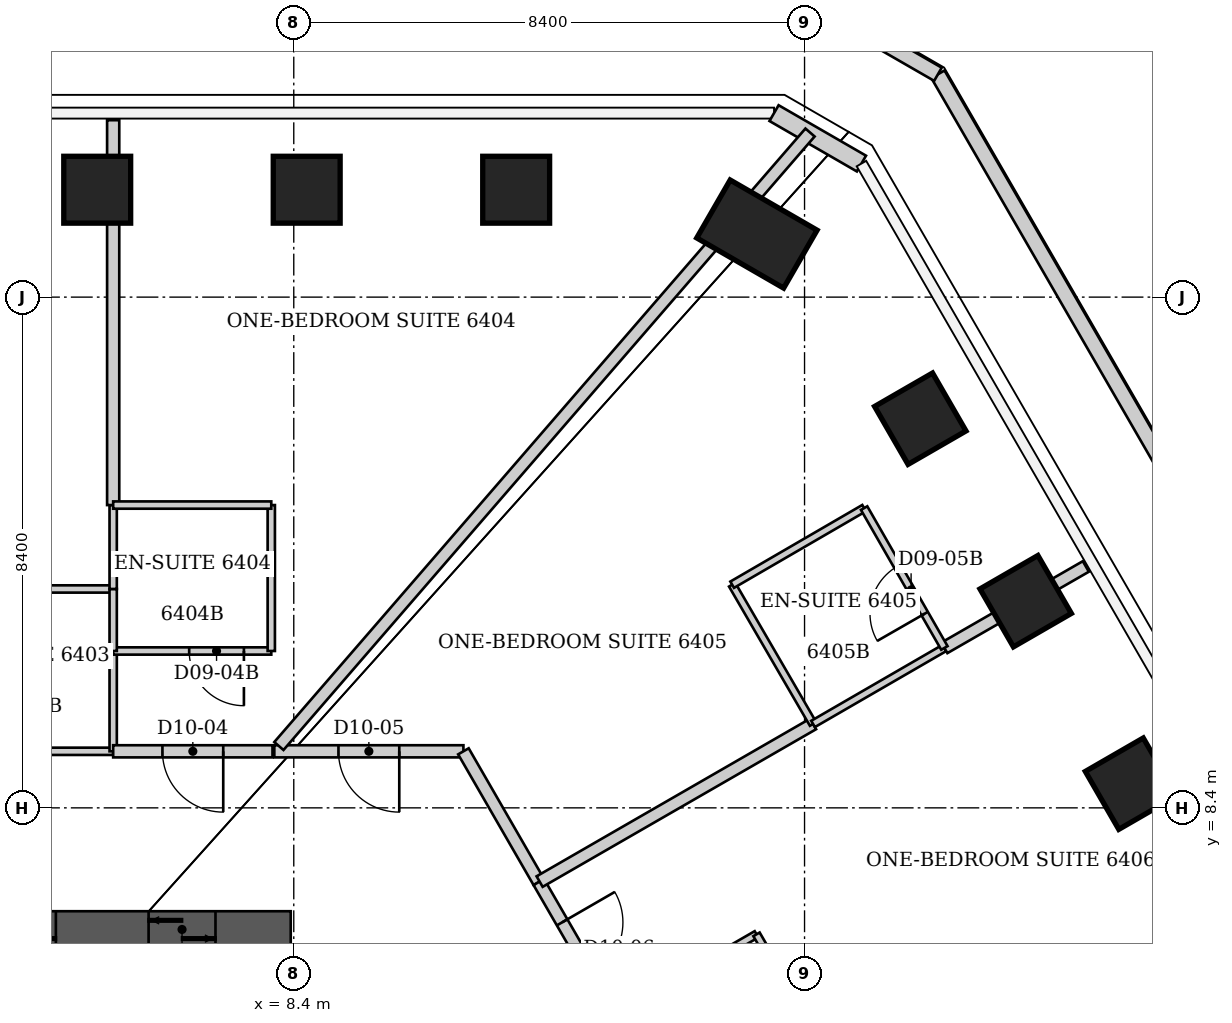
"""IFC4 building model, lengths in metres.
Left out: names, types, materials, properties, quantities, classifications, styles, units other than length and angle.
Written with IfcOpenShell. Run it as: python <this file> out.ifc"""

import sys

from ifc_helpers import new_model, si_unit, direction, frame, frame_2d, origin, origin_2d, place, context, subcontext, project, spatial, rectangle, extrude, clip, halfspace, element, fill, save


model = new_model("IFC4")
c1 = context("Model", 3, precision=1e-05, world=origin(), true_north=direction((0.0, 1.0)))
c2 = subcontext(c1, "Body", "Model", "MODEL_VIEW")
j1 = project(units=[si_unit("LENGTHUNIT", "METRE"), si_unit("PLANEANGLEUNIT", "RADIAN")], contexts=[c1])
p1 = place(None, origin())
s1 = spatial("IfcSite", under=j1, at=p1, CompositionType="ELEMENT")
p2 = place(p1, origin())
s2 = spatial("IfcBuilding", under=s1, at=p2, CompositionType="ELEMENT")
p3 = place(p2, frame((0.0, 0.0, 257.0)))
s3 = spatial("IfcBuildingStorey", under=s2, at=p3, CompositionType="ELEMENT", Elevation=257.0)
p4 = place(p3, frame((5.167, 18.566, -0.052), z_axis=(0.0, 0.0, 1.0), x_axis=(0.0, 1.0, 0.0)))
e1 = element("IfcColumn", 1, at=p4, inside=s3, PredefinedType="COLUMN", context=c2, shape_type="SweptSolid", body=[
    clip(extrude(rectangle(XDim=1.1, YDim=1.1, at=origin_2d()), origin(), (0.0, 0.0, 1.0), 3.852), halfspace(frame((0.0, 0.0, 0.052)), True)),
])
p5 = place(p3, frame((8.613, 18.566, -0.06), z_axis=(0.0, 0.0, 1.0), x_axis=(0.0, 1.0, 0.0)))
e2 = element("IfcColumn", 2, at=p5, inside=s3, PredefinedType="COLUMN", context=c2, shape_type="SweptSolid", body=[
    clip(extrude(rectangle(XDim=1.1, YDim=1.1, at=origin_2d()), origin(), (0.0, 0.0, 1.0), 3.86), halfspace(frame((0.0, 0.0, 0.06)), True)),
])
p6 = place(p3, frame((12.058, 18.566, -0.067), z_axis=(0.0, 0.0, 1.0), x_axis=(0.0, 1.0, 0.0)))
e3 = element("IfcColumn", 3, at=p6, inside=s3, PredefinedType="COLUMN", context=c2, shape_type="SweptSolid", body=[
    clip(extrude(rectangle(XDim=1.1, YDim=1.1, at=origin_2d()), origin(), (0.0, 0.0, 1.0), 3.867), halfspace(frame((0.0, 0.0, 0.067)), True)),
])
p7 = place(p3, frame((16.017, 17.837, -0.069), z_axis=(0.0, 0.0, 1.0), x_axis=(0.5, 0.866025403784, 0.0)))
e4 = element("IfcColumn", 4, at=p7, inside=s3, PredefinedType="COLUMN", context=c2, shape_type="SweptSolid", body=[
    clip(extrude(rectangle(XDim=1.1, YDim=1.65, at=origin_2d()), origin(), (0.0, 0.0, 1.0), 3.869), halfspace(frame((0.0, 0.0, 0.069)), True)),
])
p8 = place(p3, frame((18.704, 14.8, -0.059), z_axis=(0.0, 0.0, 1.0), x_axis=(0.866025403784, 0.5, 0.0)))
e5 = element("IfcColumn", 5, at=p8, inside=s3, PredefinedType="COLUMN", context=c2, shape_type="SweptSolid", body=[
    clip(extrude(rectangle(XDim=1.1, YDim=1.1, at=origin_2d()), origin(), (0.0, 0.0, 1.0), 3.859), halfspace(frame((0.0, 0.0, 0.059)), True)),
])
p9 = place(p3, frame((20.437, 11.799, -0.051), z_axis=(0.0, 0.0, 1.0), x_axis=(0.866025403784, 0.5, 0.0)))
e6 = element("IfcColumn", 6, at=p9, inside=s3, PredefinedType="COLUMN", context=c2, shape_type="SweptSolid", body=[
    clip(extrude(rectangle(XDim=1.1, YDim=1.1, at=origin_2d()), origin(), (0.0, 0.0, 1.0), 3.851), halfspace(frame((0.0, 0.0, 0.051)), True)),
])
p10 = place(p3, frame((22.169, 8.798, -0.059), z_axis=(0.0, 0.0, 1.0), x_axis=(0.866025403784, 0.5, 0.0)))
e7 = element("IfcColumn", 7, at=p10, inside=s3, PredefinedType="COLUMN", context=c2, shape_type="SweptSolid", body=[
    clip(extrude(rectangle(XDim=1.1, YDim=1.1, at=origin_2d()), origin(), (0.0, 0.0, 1.0), 3.859), halfspace(frame((0.0, 0.0, 0.059)), True)),
])
p11 = place(p3, frame((-8.35, 6.4, 0.0), z_axis=(0.0, 0.0, 1.0), x_axis=(1.0, 0.0, 0.0)))
e8 = element("IfcWall", 8, at=p11, inside=s3, PredefinedType="SHEAR", context=c2, shape_type="SweptSolid", body=[
    extrude(rectangle(XDim=16.7, YDim=0.6, at=frame_2d((8.35, 0.0))), origin(), (0.0, 0.0, 1.0), 3.8),
])
p12 = place(p11, frame((6.488, 0.0, 0.0)))
e9 = element("IfcOpeningElement", 9, at=p12, cuts=e8, PredefinedType="OPENING", context=c2, shape_type="SweptSolid", body=[
    extrude(rectangle(XDim=1.1, YDim=2.1, at=frame_2d((0.55, 1.05))), frame((0.0, 0.3, 0.0), z_axis=(0.0, -1.0, 0.0), x_axis=(1.0, 0.0, 0.0)), (0.0, 0.0, 1.0), 0.6),
])
p13 = place(p11, frame((9.113, 0.0, 0.0)))
e10 = element("IfcOpeningElement", 10, at=p13, cuts=e8, PredefinedType="OPENING", context=c2, shape_type="SweptSolid", body=[
    extrude(rectangle(XDim=1.1, YDim=2.1, at=frame_2d((0.55, 1.05))), frame((0.0, 0.3, 0.0), z_axis=(0.0, -1.0, 0.0), x_axis=(1.0, 0.0, 0.0)), (0.0, 0.0, 1.0), 0.6),
])
p14 = place(p11, frame((11.738, 0.0, 0.0)))
e11 = element("IfcOpeningElement", 11, at=p14, cuts=e8, PredefinedType="OPENING", context=c2, shape_type="SweptSolid", body=[
    extrude(rectangle(XDim=1.1, YDim=2.1, at=frame_2d((0.55, 1.05))), frame((0.0, 0.3, 0.0), z_axis=(0.0, -1.0, 0.0), x_axis=(1.0, 0.0, 0.0)), (0.0, 0.0, 1.0), 0.6),
])
p15 = place(p11, frame((14.363, 0.0, 0.0)))
e12 = element("IfcOpeningElement", 12, at=p15, cuts=e8, PredefinedType="OPENING", context=c2, shape_type="SweptSolid", body=[
    extrude(rectangle(XDim=1.1, YDim=2.1, at=frame_2d((0.55, 1.05))), frame((0.0, 0.3, 0.0), z_axis=(0.0, -1.0, 0.0), x_axis=(1.0, 0.0, 0.0)), (0.0, 0.0, 1.0), 0.6),
])
p16 = place(p3, frame((16.298, 19.826, 0.0), z_axis=(0.0, 0.0, 1.0), x_axis=(0.866026405774, -0.499998264499, 0.0)))
e13 = element("IfcWall", 13, at=p16, inside=s3, PredefinedType="SOLIDWALL", context=c2, shape_type="SweptSolid", body=[
    extrude(rectangle(XDim=1.66, YDim=0.3, at=frame_2d((0.83, 0.0))), origin(), (0.0, 0.0, 1.0), 3.64),
])
p17 = place(p3, frame((27.22, 6.217, 0.0), z_axis=(0.0, 0.0, 1.0), x_axis=(-0.49999647861, 0.86602743685, 0.0)))
e14 = element("IfcWall", 14, at=p17, inside=s3, PredefinedType="PARAPET", context=c2, shape_type="SweptSolid", body=[
    extrude(rectangle(XDim=16.453, YDim=0.25, at=frame_2d((8.226, 0.0))), origin(), (0.0, 0.0, 1.0), 1.1),
])
p18 = place(p3, frame((18.994, 20.465, 0.0), z_axis=(0.0, 0.0, 1.0), x_axis=(-0.866531606097, 0.499122205112, 0.0)))
e15 = element("IfcWall", 15, at=p18, inside=s3, PredefinedType="PARAPET", context=c2, shape_type="SweptSolid", body=[
    extrude(rectangle(XDim=1.761, YDim=0.25, at=frame_2d((0.88, 0.0))), origin(), (0.0, 0.0, 1.0), 1.1),
])
p19 = place(p3, frame((5.43, 9.33, 0.0), z_axis=(0.0, 0.0, 1.0), x_axis=(-1.0, 0.0, 0.0)))
e16 = element("IfcWall", 16, at=p19, inside=s3, PredefinedType="PARTITIONING", context=c2, shape_type="SweptSolid", body=[
    extrude(rectangle(XDim=2.45, YDim=0.12, at=frame_2d((1.225, 0.0))), origin(), (0.0, 0.0, 1.0), 3.64),
])
p20 = place(p3, frame((5.43, 10.98, 0.0), z_axis=(0.0, 0.0, 1.0), x_axis=(0.0, -1.0, 0.0)))
e17 = element("IfcWall", 17, at=p20, inside=s3, PredefinedType="PARTITIONING", context=c2, shape_type="SweptSolid", body=[
    extrude(rectangle(XDim=1.65, YDim=0.12, at=frame_2d((0.825, 0.0))), origin(), (0.0, 0.0, 1.0), 3.64),
])
p21 = place(p3, frame((5.43, 10.98, 0.0), z_axis=(0.0, 0.0, 1.0), x_axis=(1.0, 0.0, 0.0)))
e18 = element("IfcWall", 18, at=p21, inside=s3, PredefinedType="PARTITIONING", context=c2, shape_type="SweptSolid", body=[
    extrude(rectangle(XDim=2.6, YDim=0.12, at=frame_2d((1.3, 0.0))), origin(), (0.0, 0.0, 1.0), 3.64),
])
p22 = place(p21, frame((1.25, 0.0, 0.0)))
e19 = element("IfcOpeningElement", 19, at=p22, cuts=e18, PredefinedType="OPENING", context=c2, shape_type="SweptSolid", body=[
    extrude(rectangle(XDim=0.9, YDim=2.03, at=frame_2d((0.45, 1.015))), frame((0.0, 0.06, 0.0), z_axis=(0.0, -1.0, 0.0), x_axis=(1.0, 0.0, 0.0)), (0.0, 0.0, 1.0), 0.12),
])
p23 = place(p3, frame((5.43, 12.0, 0.0), z_axis=(0.0, 0.0, 1.0), x_axis=(-1.0, 0.0, 0.0)))
e20 = element("IfcWall", 20, at=p23, inside=s3, PredefinedType="PARTITIONING", context=c2, shape_type="SweptSolid", body=[
    extrude(rectangle(XDim=2.45, YDim=0.12, at=frame_2d((1.225, 0.0))), origin(), (0.0, 0.0, 1.0), 3.64),
])
p24 = place(p3, frame((5.43, 12.0, 0.0), z_axis=(0.0, 0.0, 1.0), x_axis=(0.0, -1.0, 0.0)))
e21 = element("IfcWall", 21, at=p24, inside=s3, PredefinedType="PARTITIONING", context=c2, shape_type="SweptSolid", body=[
    extrude(rectangle(XDim=1.02, YDim=0.12, at=frame_2d((0.51, 0.0))), origin(), (0.0, 0.0, 1.0), 3.64),
])
p25 = place(p3, frame((5.43, 13.38, 0.0), z_axis=(0.0, 0.0, 1.0), x_axis=(0.0, -1.0, 0.0)))
e22 = element("IfcWall", 22, at=p25, inside=s3, PredefinedType="PARTITIONING", context=c2, shape_type="SweptSolid", body=[
    extrude(rectangle(XDim=1.38, YDim=0.12, at=frame_2d((0.69, 0.0))), origin(), (0.0, 0.0, 1.0), 3.64),
])
p26 = place(p3, frame((5.43, 19.71, 0.0), z_axis=(0.0, 0.0, 1.0), x_axis=(0.0, -1.0, 0.0)))
e23 = element("IfcWall", 23, at=p26, inside=s3, PredefinedType="PARTITIONING", context=c2, shape_type="SweptSolid", body=[
    extrude(rectangle(XDim=6.33, YDim=0.2, at=frame_2d((3.165, 0.0))), origin(), (0.0, 0.0, 1.0), 3.64),
])
p27 = place(p3, frame((8.03, 10.98, 0.0), z_axis=(0.0, 0.0, 1.0), x_axis=(0.0, 1.0, 0.0)))
e24 = element("IfcWall", 24, at=p27, inside=s3, PredefinedType="PARTITIONING", context=c2, shape_type="SweptSolid", body=[
    extrude(rectangle(XDim=2.4, YDim=0.12, at=frame_2d((1.2, 0.0))), origin(), (0.0, 0.0, 1.0), 3.64),
])
p28 = place(p3, frame((8.03, 13.38, 0.0), z_axis=(0.0, 0.0, 1.0), x_axis=(-1.0, 0.0, 0.0)))
e25 = element("IfcWall", 25, at=p28, inside=s3, PredefinedType="PARTITIONING", context=c2, shape_type="SweptSolid", body=[
    extrude(rectangle(XDim=2.6, YDim=0.12, at=frame_2d((1.3, 0.0))), origin(), (0.0, 0.0, 1.0), 3.64),
])
p29 = place(p3, frame((8.05, 9.33, 0.0), z_axis=(0.0, 0.0, 1.0), x_axis=(-1.0, 0.0, 0.0)))
e26 = element("IfcWall", 26, at=p29, inside=s3, PredefinedType="PARTITIONING", context=c2, shape_type="SweptSolid", body=[
    extrude(rectangle(XDim=2.62, YDim=0.2, at=frame_2d((1.31, 0.0))), origin(), (0.0, 0.0, 1.0), 3.64),
])
p30 = place(p29, frame((0.81, 0.0, 0.0)))
e27 = element("IfcOpeningElement", 27, at=p30, cuts=e26, PredefinedType="OPENING", context=c2, shape_type="SweptSolid", body=[
    extrude(rectangle(XDim=1.0, YDim=2.13, at=frame_2d((0.5, 1.065))), frame((0.0, 0.1, 0.0), z_axis=(0.0, -1.0, 0.0), x_axis=(1.0, 0.0, 0.0)), (0.0, 0.0, 1.0), 0.2),
])
p31 = place(p3, frame((11.19, 9.33, 0.0), z_axis=(0.0, 0.0, 1.0), x_axis=(-1.0, 0.0, 0.0)))
e28 = element("IfcWall", 28, at=p31, inside=s3, PredefinedType="PARTITIONING", context=c2, shape_type="SweptSolid", body=[
    extrude(rectangle(XDim=3.11, YDim=0.2, at=frame_2d((1.555, 0.0))), origin(), (0.0, 0.0, 1.0), 3.64),
])
p32 = place(p31, frame((1.055, 0.0, 0.0)))
e29 = element("IfcOpeningElement", 29, at=p32, cuts=e28, PredefinedType="OPENING", context=c2, shape_type="SweptSolid", body=[
    extrude(rectangle(XDim=1.0, YDim=2.13, at=frame_2d((0.5, 1.065))), frame((0.0, 0.1, 0.0), z_axis=(0.0, -1.0, 0.0), x_axis=(1.0, 0.0, 0.0)), (0.0, 0.0, 1.0), 0.2),
])
p33 = place(p3, frame((11.19, 9.33, 0.0), z_axis=(0.0, 0.0, 1.0), x_axis=(0.499577688184, -0.866269088372, 0.0)))
e30 = element("IfcWall", 30, at=p33, inside=s3, PredefinedType="PARTITIONING", context=c2, shape_type="SweptSolid", body=[
    extrude(rectangle(XDim=2.482, YDim=0.2, at=frame_2d((1.241, 0.0))), origin(), (0.0, 0.0, 1.0), 3.64),
])
p34 = place(p3, frame((12.43, 7.18, 0.0), z_axis=(0.0, 0.0, 1.0), x_axis=(0.500329012441, -0.865835365015, 0.0)))
e31 = element("IfcWall", 31, at=p34, inside=s3, PredefinedType="PARTITIONING", context=c2, shape_type="SweptSolid", body=[
    extrude(rectangle(XDim=2.531, YDim=0.2, at=frame_2d((1.266, 0.0))), origin(), (0.0, 0.0, 1.0), 3.64),
])
p35 = place(p34, frame((0.766, 0.0, 0.0)))
e32 = element("IfcOpeningElement", 32, at=p35, cuts=e31, PredefinedType="OPENING", context=c2, shape_type="SweptSolid", body=[
    extrude(rectangle(XDim=1.0, YDim=2.13, at=frame_2d((0.5, 1.065))), frame((0.0, 0.1, 0.0), z_axis=(0.0, -1.0, 0.0), x_axis=(1.0, 0.0, 0.0)), (0.0, 0.0, 1.0), 0.2),
])
p36 = place(p3, frame((12.443, 7.188, 0.0), z_axis=(0.0, 0.0, 1.0), x_axis=(0.866335108717, 0.499463191241, 0.0)))
e33 = element("IfcWall", 33, at=p36, inside=s3, PredefinedType="PARTITIONING", context=c2, shape_type="SweptSolid", body=[
    extrude(rectangle(XDim=5.191, YDim=0.2, at=frame_2d((2.595, 0.0))), origin(), (0.0, 0.0, 1.0), 2.878),
])
p37 = place(p3, frame((15.61, 12.07, 0.0), z_axis=(0.0, 0.0, 1.0), x_axis=(0.502173326652, -0.864766991738, 0.0)))
e34 = element("IfcWall", 34, at=p37, inside=s3, PredefinedType="PARTITIONING", context=c2, shape_type="SweptSolid", body=[
    extrude(rectangle(XDim=2.648, YDim=0.12, at=frame_2d((1.324, 0.0))), origin(), (0.0, 0.0, 1.0), 3.64),
])
p38 = place(p3, frame((16.01, 6.32, 0.0), z_axis=(0.0, 0.0, 1.0), x_axis=(-0.866615255992, -0.498976951453, 0.0)))
e35 = element("IfcWall", 35, at=p38, inside=s3, PredefinedType="PARTITIONING", context=c2, shape_type="SweptSolid", body=[
    extrude(rectangle(XDim=2.666, YDim=0.12, at=frame_2d((1.333, 0.0))), origin(), (0.0, 0.0, 1.0), 3.64),
])
p39 = place(p38, frame((1.466, 0.0, 0.0)))
e36 = element("IfcOpeningElement", 36, at=p39, cuts=e35, PredefinedType="OPENING", context=c2, shape_type="SweptSolid", body=[
    extrude(rectangle(XDim=0.9, YDim=2.03, at=frame_2d((0.45, 1.015))), frame((0.0, 0.06, 0.0), z_axis=(0.0, -1.0, 0.0), x_axis=(1.0, 0.0, 0.0)), (0.0, 0.0, 1.0), 0.12),
])
p40 = place(p3, frame((16.89, 19.507, 0.0), z_axis=(0.0, 0.0, 1.0), x_axis=(-0.654509091565, -0.756054131037, 0.0)))
e37 = element("IfcWall", 37, at=p40, inside=s3, PredefinedType="PARTITIONING", context=c2, shape_type="SweptSolid", body=[
    extrude(rectangle(XDim=13.346, YDim=0.2, at=frame_2d((6.673, 0.0))), origin(), (0.0, 0.0, 1.0), 3.64),
])
p41 = place(p3, frame((16.94, 9.78, 0.0), z_axis=(0.0, 0.0, 1.0), x_axis=(0.865533423938, 0.500851167559, 0.0)))
e38 = element("IfcWall", 38, at=p41, inside=s3, PredefinedType="PARTITIONING", context=c2, shape_type="SweptSolid", body=[
    extrude(rectangle(XDim=2.496, YDim=0.12, at=frame_2d((1.248, 0.0))), origin(), (0.0, 0.0, 1.0), 2.878),
])
p42 = place(p3, frame((17.26, 4.16, 0.0), z_axis=(0.0, 0.0, 1.0), x_axis=(-0.500851167559, 0.865533423938, 0.0)))
e39 = element("IfcWall", 39, at=p42, inside=s3, PredefinedType="PARTITIONING", context=c2, shape_type="SweptSolid", body=[
    extrude(rectangle(XDim=2.496, YDim=0.12, at=frame_2d((1.248, 0.0))), origin(), (0.0, 0.0, 1.0), 3.64),
])
p43 = place(p3, frame((17.78, 13.33, 0.0), z_axis=(0.0, 0.0, 1.0), x_axis=(-0.864803937094, -0.502109699555, 0.0)))
e40 = element("IfcWall", 40, at=p43, inside=s3, PredefinedType="PARTITIONING", context=c2, shape_type="SweptSolid", body=[
    extrude(rectangle(XDim=2.51, YDim=0.12, at=frame_2d((1.255, 0.0))), origin(), (0.0, 0.0, 1.0), 3.64),
])
p44 = place(p3, frame((19.099, 11.031, 0.0), z_axis=(0.0, 0.0, 1.0), x_axis=(0.866739223556, 0.498761584678, 0.0)))
e41 = element("IfcWall", 41, at=p44, inside=s3, PredefinedType="PARTITIONING", context=c2, shape_type="SweptSolid", body=[
    extrude(rectangle(XDim=2.684, YDim=0.2, at=frame_2d((1.342, 0.0))), origin(), (0.0, 0.0, 1.0), 2.878),
])
p45 = place(p3, frame((19.1, 11.03, 0.0), z_axis=(0.0, 0.0, 1.0), x_axis=(-0.497773911185, 0.867306827682, 0.0)))
e42 = element("IfcWall", 42, at=p45, inside=s3, PredefinedType="PARTITIONING", context=c2, shape_type="SweptSolid", body=[
    extrude(rectangle(XDim=2.652, YDim=0.12, at=frame_2d((1.326, 0.0))), origin(), (0.0, 0.0, 1.0), 3.64),
])
p46 = place(p45, frame((0.65, 0.0, 0.0)))
e43 = element("IfcOpeningElement", 43, at=p46, cuts=e42, PredefinedType="OPENING", context=c2, shape_type="SweptSolid", body=[
    extrude(rectangle(XDim=0.9, YDim=2.03, at=frame_2d((0.45, 1.015))), frame((0.0, 0.06, 0.0), z_axis=(0.0, -1.0, 0.0), x_axis=(1.0, 0.0, 0.0)), (0.0, 0.0, 1.0), 0.12),
])
p47 = place(p30, origin())
e44 = element("IfcDoor", 44, at=p47, inside=s3, OperationType="SINGLE_SWING_LEFT", PredefinedType="DOOR", context=c2, shape_type="SweptSolid", body=[
    extrude(rectangle(XDim=1.0, YDim=2.13, at=frame_2d((0.5, 1.065))), frame((0.0, 0.025, 0.0), z_axis=(0.0, -1.0, 0.0), x_axis=(1.0, 0.0, 0.0)), (0.0, 0.0, 1.0), 0.05),
])
fill(e27, e44)
p48 = place(p22, origin())
e45 = element("IfcDoor", 45, at=p48, inside=s3, OperationType="SINGLE_SWING_RIGHT", PredefinedType="DOOR", context=c2, shape_type="SweptSolid", body=[
    extrude(rectangle(XDim=0.9, YDim=2.03, at=frame_2d((0.45, 1.015))), frame((0.0, 0.025, 0.0), z_axis=(0.0, -1.0, 0.0), x_axis=(1.0, 0.0, 0.0)), (0.0, 0.0, 1.0), 0.05),
])
fill(e19, e45)
p49 = place(p32, origin())
e46 = element("IfcDoor", 46, at=p49, inside=s3, OperationType="SINGLE_SWING_LEFT", PredefinedType="DOOR", context=c2, shape_type="SweptSolid", body=[
    extrude(rectangle(XDim=1.0, YDim=2.13, at=frame_2d((0.5, 1.065))), frame((0.0, 0.025, 0.0), z_axis=(0.0, -1.0, 0.0), x_axis=(1.0, 0.0, 0.0)), (0.0, 0.0, 1.0), 0.05),
])
fill(e29, e46)
p50 = place(p46, origin())
e47 = element("IfcDoor", 47, at=p50, inside=s3, OperationType="SINGLE_SWING_LEFT", PredefinedType="DOOR", context=c2, shape_type="SweptSolid", body=[
    extrude(rectangle(XDim=0.9, YDim=2.03, at=frame_2d((0.45, 1.015))), frame((0.0, 0.025, 0.0), z_axis=(0.0, -1.0, 0.0), x_axis=(1.0, 0.0, 0.0)), (0.0, 0.0, 1.0), 0.05),
])
fill(e43, e47)
p51 = place(p35, origin())
e48 = element("IfcDoor", 48, at=p51, inside=s3, OperationType="SINGLE_SWING_LEFT", PredefinedType="DOOR", context=c2, shape_type="SweptSolid", body=[
    extrude(rectangle(XDim=1.0, YDim=2.13, at=frame_2d((0.5, 1.065))), frame((0.0, 0.025, 0.0), z_axis=(0.0, -1.0, 0.0), x_axis=(1.0, 0.0, 0.0)), (0.0, 0.0, 1.0), 0.05),
])
fill(e32, e48)
p52 = place(p14, origin())
e49 = element("IfcDoor", 49, at=p52, inside=s3, OperationType="DOUBLE_DOOR_SLIDING", PredefinedType="DOOR", context=c2, shape_type="SweptSolid", body=[
    extrude(rectangle(XDim=1.1, YDim=2.1, at=frame_2d((0.55, 1.05))), frame((0.0, 0.025, 0.0), z_axis=(0.0, -1.0, 0.0), x_axis=(1.0, 0.0, 0.0)), (0.0, 0.0, 1.0), 0.05),
])
fill(e11, e49)
p53 = place(p15, origin())
e50 = element("IfcDoor", 50, at=p53, inside=s3, OperationType="DOUBLE_DOOR_SLIDING", PredefinedType="DOOR", context=c2, shape_type="SweptSolid", body=[
    extrude(rectangle(XDim=1.1, YDim=2.1, at=frame_2d((0.55, 1.05))), frame((0.0, 0.025, 0.0), z_axis=(0.0, -1.0, 0.0), x_axis=(1.0, 0.0, 0.0)), (0.0, 0.0, 1.0), 0.05),
])
fill(e12, e50)
save(model, sys.argv[1])
